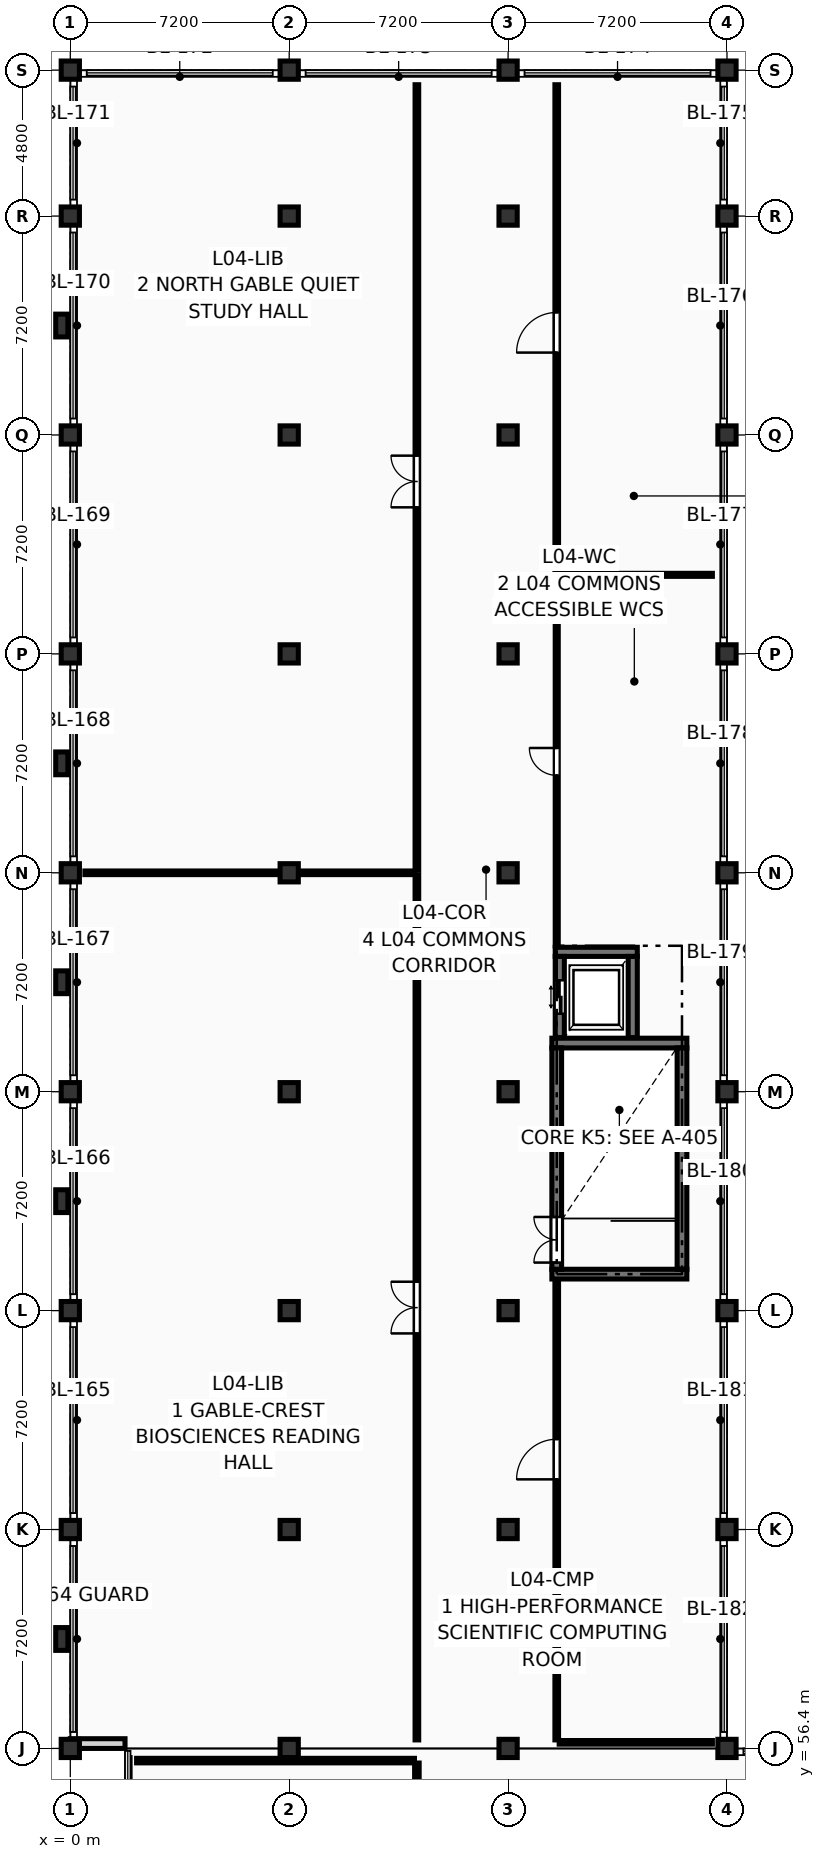
"""IFC4 building model, lengths in metres.
Left out: names, types, materials, properties, quantities, classifications, styles, units other than length and angle.
Written with IfcOpenShell. Run it as: python <this file> out.ifc"""

import sys

from ifc_helpers import new_model, si_unit, direction, frame, frame_2d, origin, origin_2d, place, context, subcontext, project, spatial, rectangle, extrude, element, fill, save


model = new_model("IFC4")
c1 = context("Model", 3, precision=1e-05, world=origin(), true_north=direction((0.0, 1.0)))
c2 = subcontext(c1, "Body", "Model", "MODEL_VIEW")
j1 = project(units=[si_unit("LENGTHUNIT", "METRE"), si_unit("PLANEANGLEUNIT", "RADIAN")], contexts=[c1])
p1 = place(None, origin())
s1 = spatial("IfcSite", under=j1, at=p1, CompositionType="ELEMENT")
p2 = place(p1, origin())
s2 = spatial("IfcBuilding", under=s1, at=p2, CompositionType="ELEMENT")
p3 = place(p2, frame((0.0, 0.0, 15.75)))
s3 = spatial("IfcBuildingStorey", under=s2, at=p3, CompositionType="ELEMENT", Elevation=15.75)
for number, where, z_axis, x_axis in (
    (1, (0.0, 56.4, 0.0), (0.0, 0.0, 1.0), (1.0, 0.0, 0.0)),
    (2, (0.0, 63.6, 0.0), (0.0, 0.0, 1.0), (1.0, 0.0, 0.0)),
    (3, (0.0, 70.8, 0.0), (0.0, 0.0, 1.0), (1.0, 0.0, 0.0)),
    (4, (0.0, 78.0, 0.0), (0.0, 0.0, 1.0), (1.0, 0.0, 0.0)),
    (5, (0.0, 85.2, 0.0), (0.0, 0.0, 1.0), (1.0, 0.0, 0.0)),
    (6, (0.0, 92.4, 0.0), (0.0, 0.0, 1.0), (1.0, 0.0, 0.0)),
    (7, (0.0, 99.6, 0.0), (0.0, 0.0, 1.0), (1.0, 0.0, 0.0)),
    (8, (0.0, 106.8, 0.0), (0.0, 0.0, 1.0), (1.0, 0.0, 0.0)),
    (9, (0.0, 111.6, 0.0), (0.0, 0.0, 1.0), (1.0, 0.0, 0.0)),
    (10, (7.2, 56.4, 0.0), (0.0, 0.0, 1.0), (1.0, 0.0, 0.0)),
    (11, (7.2, 63.6, 0.0), (0.0, 0.0, 1.0), (1.0, 0.0, 0.0)),
    (12, (7.2, 70.8, 0.0), (0.0, 0.0, 1.0), (1.0, 0.0, 0.0)),
    (13, (7.2, 78.0, 0.0), (0.0, 0.0, 1.0), (1.0, 0.0, 0.0)),
    (14, (7.2, 85.2, 0.0), (0.0, 0.0, 1.0), (1.0, 0.0, 0.0)),
    (15, (7.2, 92.4, 0.0), (0.0, 0.0, 1.0), (1.0, 0.0, 0.0)),
    (16, (7.2, 99.6, 0.0), (0.0, 0.0, 1.0), (1.0, 0.0, 0.0)),
    (17, (7.2, 106.8, 0.0), (0.0, 0.0, 1.0), (1.0, 0.0, 0.0)),
    (18, (7.2, 111.6, 0.0), (0.0, 0.0, 1.0), (1.0, 0.0, 0.0)),
    (19, (14.4, 56.4, 0.0), (0.0, 0.0, 1.0), (1.0, 0.0, 0.0)),
    (20, (14.4, 63.6, 0.0), (0.0, 0.0, 1.0), (1.0, 0.0, 0.0)),
    (21, (14.4, 70.8, 0.0), (0.0, 0.0, 1.0), (1.0, 0.0, 0.0)),
    (22, (14.4, 78.0, 0.0), (0.0, 0.0, 1.0), (1.0, 0.0, 0.0)),
    (23, (14.4, 85.2, 0.0), (0.0, 0.0, 1.0), (1.0, 0.0, 0.0)),
    (24, (14.4, 92.4, 0.0), (0.0, 0.0, 1.0), (1.0, 0.0, 0.0)),
    (25, (14.4, 99.6, 0.0), (0.0, 0.0, 1.0), (1.0, 0.0, 0.0)),
    (26, (14.4, 106.8, 0.0), (0.0, 0.0, 1.0), (1.0, 0.0, 0.0)),
    (27, (14.4, 111.6, 0.0), (0.0, 0.0, 1.0), (1.0, 0.0, 0.0)),
    (28, (21.6, 56.4, 0.0), (0.0, 0.0, 1.0), (1.0, 0.0, 0.0)),
    (29, (21.6, 63.6, 0.0), (0.0, 0.0, 1.0), (1.0, 0.0, 0.0)),
    (30, (21.6, 70.8, 0.0), (0.0, 0.0, 1.0), (1.0, 0.0, 0.0)),
    (31, (21.6, 78.0, 0.0), (0.0, 0.0, 1.0), (1.0, 0.0, 0.0)),
    (32, (21.6, 85.2, 0.0), (0.0, 0.0, 1.0), (1.0, 0.0, 0.0)),
    (33, (21.6, 92.4, 0.0), (0.0, 0.0, 1.0), (1.0, 0.0, 0.0)),
    (34, (21.6, 99.6, 0.0), (0.0, 0.0, 1.0), (1.0, 0.0, 0.0)),
    (35, (21.6, 106.8, 0.0), (0.0, 0.0, 1.0), (1.0, 0.0, 0.0)),
    (36, (21.6, 111.6, 0.0), (0.0, 0.0, 1.0), (1.0, 0.0, 0.0)),
):
    element("IfcColumn", number, at=place(p3, frame(where, z_axis=z_axis, x_axis=x_axis)), inside=s3, PredefinedType="COLUMN", context=c2, shape_type="SweptSolid", body=[
        extrude(rectangle(XDim=0.6, YDim=0.6, at=origin_2d()), origin(), (0.0, 0.0, 1.0), 3.6),
    ])
for number, where, z_axis, x_axis in (
    (37, (-0.28, 60.0, 0.0), (0.0, 0.0, 1.0), (1.0, 0.0, 0.0)),
    (38, (-0.28, 74.4, 0.0), (0.0, 0.0, 1.0), (1.0, 0.0, 0.0)),
    (39, (-0.28, 81.6, 0.0), (0.0, 0.0, 1.0), (1.0, 0.0, 0.0)),
    (40, (-0.28, 88.8, 0.0), (0.0, 0.0, 1.0), (1.0, 0.0, 0.0)),
    (41, (-0.28, 103.2, 0.0), (0.0, 0.0, 1.0), (1.0, 0.0, 0.0)),
):
    element("IfcColumn", number, at=place(p3, frame(where, z_axis=z_axis, x_axis=x_axis)), inside=s3, PredefinedType="PILASTER", context=c2, shape_type="SweptSolid", body=[
        extrude(rectangle(XDim=0.4, YDim=0.75, at=origin_2d()), origin(), (0.0, 0.0, 1.0), 3.6),
    ])
p4 = place(p3, frame((0.0, 56.56, 0.0), z_axis=(0.0, 0.0, 1.0), x_axis=(1.0, 0.0, 0.0)))
e42 = element("IfcWall", 42, at=p4, inside=s3, PredefinedType="SOLIDWALL", context=c2, shape_type="SweptSolid", body=[
    extrude(rectangle(XDim=1.8, YDim=0.32, at=frame_2d((0.9, 0.0))), origin(), (0.0, 0.0, 1.0), 3.38),
])
for number, where, z_axis, x_axis in (
    (43, (15.84, 72.0, 0.0), (0.0, 0.0, 1.0), (1.0, 0.0, 0.0)),
    (44, (15.84, 79.6, 0.0), (0.0, 0.0, 1.0), (1.0, 0.0, 0.0)),
):
    element("IfcWall", number, at=place(p3, frame(where, z_axis=z_axis, x_axis=x_axis)), inside=s3, PredefinedType="SHEAR", context=c2, shape_type="SweptSolid", body=[
        extrude(rectangle(XDim=4.44, YDim=0.32, at=frame_2d((2.22, 0.0))), origin(), (0.0, 0.0, 1.0), 3.39),
    ])
p5 = place(p3, frame((16.0, 72.16, 0.0), z_axis=(0.0, 0.0, 1.0), x_axis=(0.0, 1.0, 0.0)))
e45 = element("IfcWall", 45, at=p5, inside=s3, PredefinedType="SHEAR", context=c2, shape_type="SweptSolid", body=[
    extrude(rectangle(XDim=7.28, YDim=0.32, at=frame_2d((3.64, 0.0))), origin(), (0.0, 0.0, 1.0), 3.39),
])
p6 = place(p5, frame((0.22, 0.0, 0.0)))
e46 = element("IfcOpeningElement", 46, at=p6, cuts=e45, PredefinedType="OPENING", context=c2, shape_type="SweptSolid", body=[
    extrude(rectangle(XDim=1.5, YDim=2.2, at=frame_2d((0.75, 1.1))), frame((0.0, 0.172, 0.0), z_axis=(0.0, -1.0, 0.0), x_axis=(1.0, 0.0, 0.0)), (0.0, 0.0, 1.0), 0.344),
])
p7 = place(p3, frame((20.12, 72.16, 0.0), z_axis=(0.0, 0.0, 1.0), x_axis=(0.0, 1.0, 0.0)))
e47 = element("IfcWall", 47, at=p7, inside=s3, PredefinedType="SHEAR", context=c2, shape_type="SweptSolid", body=[
    extrude(rectangle(XDim=7.28, YDim=0.32, at=frame_2d((3.64, 0.0))), origin(), (0.0, 0.0, 1.0), 3.39),
])
p8 = place(p3, frame((15.95, 82.6, 0.0), z_axis=(0.0, 0.0, 1.0), x_axis=(1.0, 0.0, 0.0)))
e48 = element("IfcWall", 48, at=p8, inside=s3, PredefinedType="SHEAR", context=c2, shape_type="SweptSolid", body=[
    extrude(rectangle(XDim=2.7, YDim=0.3, at=frame_2d((1.35, 0.0))), origin(), (0.0, 0.0, 1.0), 3.39),
])
p9 = place(p3, frame((16.1, 79.78, 0.0), z_axis=(0.0, 0.0, 1.0), x_axis=(0.0, 1.0, 0.0)))
e49 = element("IfcWall", 49, at=p9, inside=s3, PredefinedType="SHEAR", context=c2, shape_type="SweptSolid", body=[
    extrude(rectangle(XDim=2.67, YDim=0.3, at=frame_2d((1.335, 0.0))), origin(), (0.0, 0.0, 1.0), 3.39),
])
p10 = place(p9, frame((0.785, 0.0, 0.0)))
e50 = element("IfcOpeningElement", 50, at=p10, cuts=e49, PredefinedType="OPENING", context=c2, shape_type="SweptSolid", body=[
    extrude(rectangle(XDim=1.1, YDim=2.2, at=frame_2d((0.55, 1.1))), frame((0.0, 0.162, 0.0), z_axis=(0.0, -1.0, 0.0), x_axis=(1.0, 0.0, 0.0)), (0.0, 0.0, 1.0), 0.324),
])
p11 = place(p3, frame((18.5, 79.78, 0.0), z_axis=(0.0, 0.0, 1.0), x_axis=(0.0, 1.0, 0.0)))
e51 = element("IfcWall", 51, at=p11, inside=s3, PredefinedType="SHEAR", context=c2, shape_type="SweptSolid", body=[
    extrude(rectangle(XDim=2.67, YDim=0.3, at=frame_2d((1.335, 0.0))), origin(), (0.0, 0.0, 1.0), 3.39),
])
p12 = place(p3, frame((11.4, 44.88, 0.0), z_axis=(0.0, 0.0, 1.0), x_axis=(0.0, 1.0, 0.0)))
e52 = element("IfcWall", 52, at=p12, inside=s3, PredefinedType="PARTITIONING", context=c2, shape_type="SweptSolid", body=[
    extrude(rectangle(XDim=11.04, YDim=0.15, at=frame_2d((5.52, 0.0))), origin(), (0.0, 0.0, 1.0), 3.375),
])
p13 = place(p12, frame((4.845, 0.0, 0.0)))
e53 = element("IfcOpeningElement", 53, at=p13, cuts=e52, PredefinedType="OPENING", context=c2, shape_type="SweptSolid", body=[
    extrude(rectangle(XDim=1.35, YDim=2.2, at=frame_2d((0.675, 1.1))), frame((0.0, 0.087, 0.0), z_axis=(0.0, -1.0, 0.0), x_axis=(1.0, 0.0, 0.0)), (0.0, 0.0, 1.0), 0.174),
])
p14 = place(p3, frame((2.18, 56.0, 0.0), z_axis=(0.0, 0.0, 1.0), x_axis=(1.0, 0.0, 0.0)))
e54 = element("IfcWall", 54, at=p14, inside=s3, PredefinedType="PARTITIONING", context=c2, shape_type="SweptSolid", body=[
    extrude(rectangle(XDim=9.14, YDim=0.15, at=frame_2d((4.57, 0.0))), origin(), (0.0, 0.0, 1.0), 3.375),
])
p15 = place(p3, frame((11.4, 56.68, 0.0), z_axis=(0.0, 0.0, 1.0), x_axis=(0.0, 1.0, 0.0)))
e55 = element("IfcWall", 55, at=p15, inside=s3, PredefinedType="PARTITIONING", context=c2, shape_type="SweptSolid", body=[
    extrude(rectangle(XDim=28.44, YDim=0.12, at=frame_2d((14.22, 0.0))), origin(), (0.0, 0.0, 1.0), 3.375),
])
p16 = place(p15, frame((13.37, 0.0, 0.0)))
e56 = element("IfcOpeningElement", 56, at=p16, cuts=e55, PredefinedType="OPENING", context=c2, shape_type="SweptSolid", body=[
    extrude(rectangle(XDim=1.7, YDim=2.28, at=frame_2d((0.85, 1.14))), frame((0.0, 0.072, 0.0), z_axis=(0.0, -1.0, 0.0), x_axis=(1.0, 0.0, 0.0)), (0.0, 0.0, 1.0), 0.144),
])
p17 = place(p3, frame((0.48, 85.2, 0.0), z_axis=(0.0, 0.0, 1.0), x_axis=(1.0, 0.0, 0.0)))
e57 = element("IfcWall", 57, at=p17, inside=s3, PredefinedType="PARTITIONING", context=c2, shape_type="SweptSolid", body=[
    extrude(rectangle(XDim=10.84, YDim=0.12, at=frame_2d((5.42, 0.0))), origin(), (0.0, 0.0, 1.0), 2.655),
])
p18 = place(p3, frame((11.4, 85.28, 0.0), z_axis=(0.0, 0.0, 1.0), x_axis=(0.0, 1.0, 0.0)))
e58 = element("IfcWall", 58, at=p18, inside=s3, PredefinedType="PARTITIONING", context=c2, shape_type="SweptSolid", body=[
    extrude(rectangle(XDim=25.84, YDim=0.12, at=frame_2d((12.92, 0.0))), origin(), (0.0, 0.0, 1.0), 3.375),
])
p19 = place(p18, frame((11.94, 0.0, 0.0)))
e59 = element("IfcOpeningElement", 59, at=p19, cuts=e58, PredefinedType="OPENING", context=c2, shape_type="SweptSolid", body=[
    extrude(rectangle(XDim=1.7, YDim=2.28, at=frame_2d((0.85, 1.14))), frame((0.0, 0.072, 0.0), z_axis=(0.0, -1.0, 0.0), x_axis=(1.0, 0.0, 0.0)), (0.0, 0.0, 1.0), 0.144),
])
p20 = place(p3, frame((16.0, 56.68, 0.0), z_axis=(0.0, 0.0, 1.0), x_axis=(0.0, 1.0, 0.0)))
e60 = element("IfcWall", 60, at=p20, inside=s3, PredefinedType="PARTITIONING", context=c2, shape_type="SweptSolid", body=[
    extrude(rectangle(XDim=15.12, YDim=0.12, at=frame_2d((7.56, 0.0))), origin(), (0.0, 0.0, 1.0), 3.375),
])
p21 = place(p20, frame((8.57, 0.0, 0.0)))
e61 = element("IfcOpeningElement", 61, at=p21, cuts=e60, PredefinedType="OPENING", context=c2, shape_type="SweptSolid", body=[
    extrude(rectangle(XDim=1.32, YDim=2.2, at=frame_2d((0.66, 1.1))), frame((0.0, 0.072, 0.0), z_axis=(0.0, -1.0, 0.0), x_axis=(1.0, 0.0, 0.0)), (0.0, 0.0, 1.0), 0.144),
])
p22 = place(p3, frame((16.08, 56.6, 0.0), z_axis=(0.0, 0.0, 1.0), x_axis=(1.0, 0.0, 0.0)))
e62 = element("IfcWall", 62, at=p22, inside=s3, PredefinedType="PARTITIONING", context=c2, shape_type="SweptSolid", body=[
    extrude(rectangle(XDim=5.04, YDim=0.12, at=frame_2d((2.52, 0.0))), origin(), (0.0, 0.0, 1.0), 2.691),
])
p23 = place(p3, frame((16.0, 82.79, 0.0), z_axis=(0.0, 0.0, 1.0), x_axis=(0.0, 1.0, 0.0)))
e63 = element("IfcWall", 63, at=p23, inside=s3, PredefinedType="PARTITIONING", context=c2, shape_type="SweptSolid", body=[
    extrude(rectangle(XDim=12.13, YDim=0.1, at=frame_2d((6.065, 0.0))), origin(), (0.0, 0.0, 1.0), 3.375),
])
p24 = place(p23, frame((5.615, 0.0, 0.0)))
e64 = element("IfcOpeningElement", 64, at=p24, cuts=e63, PredefinedType="OPENING", context=c2, shape_type="SweptSolid", body=[
    extrude(rectangle(XDim=0.9, YDim=2.1, at=frame_2d((0.45, 1.05))), frame((0.0, 0.062, 0.0), z_axis=(0.0, -1.0, 0.0), x_axis=(1.0, 0.0, 0.0)), (0.0, 0.0, 1.0), 0.124),
])
p25 = place(p3, frame((16.08, 95.0, 0.0), z_axis=(0.0, 0.0, 1.0), x_axis=(1.0, 0.0, 0.0)))
e65 = element("IfcWall", 65, at=p25, inside=s3, PredefinedType="PARTITIONING", context=c2, shape_type="SweptSolid", body=[
    extrude(rectangle(XDim=5.04, YDim=0.1, at=frame_2d((2.52, 0.0))), origin(), (0.0, 0.0, 1.0), 3.375),
])
p26 = place(p3, frame((16.0, 95.08, 0.0), z_axis=(0.0, 0.0, 1.0), x_axis=(0.0, 1.0, 0.0)))
e66 = element("IfcWall", 66, at=p26, inside=s3, PredefinedType="PARTITIONING", context=c2, shape_type="SweptSolid", body=[
    extrude(rectangle(XDim=16.04, YDim=0.12, at=frame_2d((8.02, 0.0))), origin(), (0.0, 0.0, 1.0), 3.375),
])
p27 = place(p26, frame((7.23, 0.0, 0.0)))
e67 = element("IfcOpeningElement", 67, at=p27, cuts=e66, PredefinedType="OPENING", context=c2, shape_type="SweptSolid", body=[
    extrude(rectangle(XDim=1.32, YDim=2.2, at=frame_2d((0.66, 1.1))), frame((0.0, 0.072, 0.0), z_axis=(0.0, -1.0, 0.0), x_axis=(1.0, 0.0, 0.0)), (0.0, 0.0, 1.0), 0.144),
])
p28 = place(p6, origin())
e68 = element("IfcDoor", 68, at=p28, inside=s3, OperationType="DOUBLE_DOOR_SINGLE_SWING", PredefinedType="DOOR", context=c2, shape_type="SweptSolid", body=[
    extrude(rectangle(XDim=1.5, YDim=2.2, at=frame_2d((0.75, 1.1))), frame((0.0, 0.025, 0.0), z_axis=(0.0, -1.0, 0.0), x_axis=(1.0, 0.0, 0.0)), (0.0, 0.0, 1.0), 0.05),
])
fill(e46, e68)
p29 = place(p10, origin())
e69 = element("IfcDoor", 69, at=p29, inside=s3, OperationType="DOUBLE_DOOR_SLIDING", PredefinedType="DOOR", context=c2, shape_type="SweptSolid", body=[
    extrude(rectangle(XDim=1.1, YDim=2.2, at=frame_2d((0.55, 1.1))), frame((0.0, 0.025, 0.0), z_axis=(0.0, -1.0, 0.0), x_axis=(1.0, 0.0, 0.0)), (0.0, 0.0, 1.0), 0.05),
])
fill(e50, e69)
p30 = place(p16, origin())
e70 = element("IfcDoor", 70, at=p30, inside=s3, OperationType="DOUBLE_DOOR_SINGLE_SWING", PredefinedType="DOOR", context=c2, shape_type="SweptSolid", body=[
    extrude(rectangle(XDim=1.7, YDim=2.28, at=frame_2d((0.85, 1.14))), frame((0.0, 0.025, 0.0), z_axis=(0.0, -1.0, 0.0), x_axis=(1.0, 0.0, 0.0)), (0.0, 0.0, 1.0), 0.05),
])
fill(e56, e70)
p31 = place(p19, origin())
e71 = element("IfcDoor", 71, at=p31, inside=s3, OperationType="DOUBLE_DOOR_SINGLE_SWING", PredefinedType="DOOR", context=c2, shape_type="SweptSolid", body=[
    extrude(rectangle(XDim=1.7, YDim=2.28, at=frame_2d((0.85, 1.14))), frame((0.0, 0.025, 0.0), z_axis=(0.0, -1.0, 0.0), x_axis=(1.0, 0.0, 0.0)), (0.0, 0.0, 1.0), 0.05),
])
fill(e59, e71)
p32 = place(p21, origin())
e72 = element("IfcDoor", 72, at=p32, inside=s3, OperationType="SINGLE_SWING_LEFT", PredefinedType="DOOR", context=c2, shape_type="SweptSolid", body=[
    extrude(rectangle(XDim=1.32, YDim=2.2, at=frame_2d((0.66, 1.1))), frame((0.0, 0.025, 0.0), z_axis=(0.0, -1.0, 0.0), x_axis=(1.0, 0.0, 0.0)), (0.0, 0.0, 1.0), 0.05),
])
fill(e61, e72)
p33 = place(p24, origin())
e73 = element("IfcDoor", 73, at=p33, inside=s3, OperationType="SINGLE_SWING_RIGHT", PredefinedType="DOOR", context=c2, shape_type="SweptSolid", body=[
    extrude(rectangle(XDim=0.9, YDim=2.1, at=frame_2d((0.45, 1.05))), frame((0.0, 0.025, 0.0), z_axis=(0.0, -1.0, 0.0), x_axis=(1.0, 0.0, 0.0)), (0.0, 0.0, 1.0), 0.05),
])
fill(e64, e73)
p34 = place(p27, origin())
e74 = element("IfcDoor", 74, at=p34, inside=s3, OperationType="SINGLE_SWING_LEFT", PredefinedType="DOOR", context=c2, shape_type="SweptSolid", body=[
    extrude(rectangle(XDim=1.32, YDim=2.2, at=frame_2d((0.66, 1.1))), frame((0.0, 0.025, 0.0), z_axis=(0.0, -1.0, 0.0), x_axis=(1.0, 0.0, 0.0)), (0.0, 0.0, 1.0), 0.05),
])
fill(e67, e74)
save(model, sys.argv[1])
